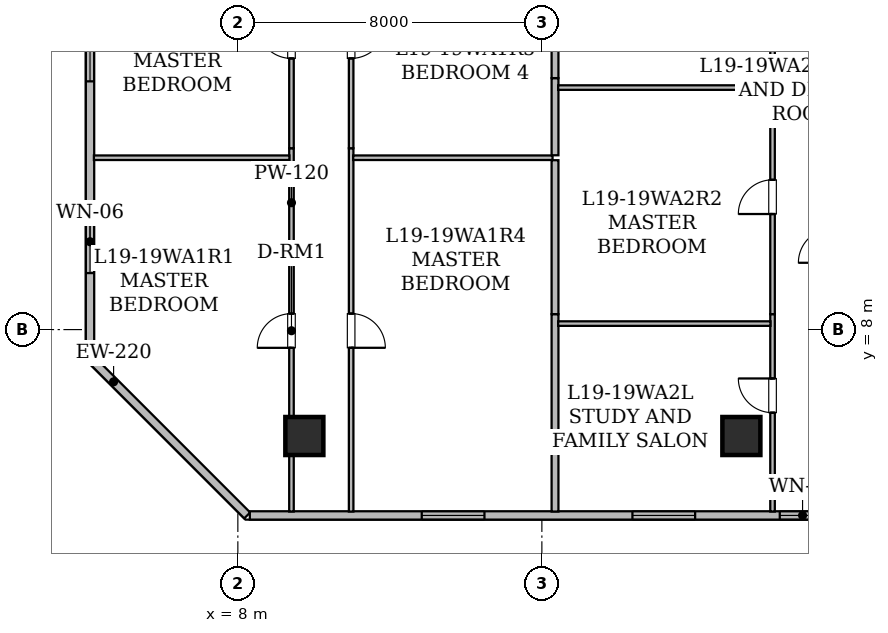
"""IFC4 building model, lengths in metres.
Left out: names, types, materials, properties, quantities, classifications, styles, units other than length and angle.
Written with IfcOpenShell. Run it as: python <this file> out.ifc"""

import sys

from ifc_helpers import new_model, si_unit, direction, frame, frame_2d, origin, origin_2d, place, context, subcontext, project, spatial, rectangle, hollow_rectangle, extrude, element, fill, save


model = new_model("IFC4")
c1 = context("Model", 3, precision=1e-05, world=origin(), true_north=direction((0.0, 1.0)))
c2 = subcontext(c1, "Body", "Model", "MODEL_VIEW")
j1 = project(units=[si_unit("LENGTHUNIT", "METRE"), si_unit("PLANEANGLEUNIT", "RADIAN")], contexts=[c1])
p1 = place(None, origin())
s1 = spatial("IfcSite", under=j1, at=p1, CompositionType="ELEMENT")
p2 = place(p1, origin())
s2 = spatial("IfcBuilding", under=s1, at=p2, CompositionType="ELEMENT")
p3 = place(p2, frame((0.0, 0.0, 77.1)))
s3 = spatial("IfcBuildingStorey", under=s2, at=p3, CompositionType="ELEMENT", Elevation=77.1)
for number, where, z_axis, x_axis in (
    (1, (9.75, 5.2, 0.0), (0.0, 0.0, 1.0), (1.0, 0.0, 0.0)),
    (2, (21.25, 5.2, 0.0), (0.0, 0.0, 1.0), (1.0, 0.0, 0.0)),
):
    element("IfcColumn", number, at=place(p3, frame(where, z_axis=z_axis, x_axis=x_axis)), inside=s3, PredefinedType="COLUMN", context=c2, shape_type="SweptSolid", body=[
        extrude(hollow_rectangle(XDim=1.0, YDim=1.0, WallThickness=0.05, at=origin_2d()), origin(), (0.0, 0.0, 1.0), 3.65),
    ])
p4 = place(p3, frame((8.246, 3.11, 0.0), z_axis=(0.0, 0.0, 1.0), x_axis=(-0.707106781187, 0.707106781187, 0.0)))
e3 = element("IfcWall", 3, at=p4, inside=s3, PredefinedType="STANDARD", context=c2, shape_type="SweptSolid", body=[
    extrude(rectangle(XDim=5.849, YDim=0.22, at=frame_2d((2.925, 0.0))), origin(), (0.0, 0.0, 1.0), 3.43),
])
p5 = place(p3, frame((4.11, 7.317, 0.0), z_axis=(0.0, 0.0, 1.0), x_axis=(0.0, 1.0, 0.0)))
e4 = element("IfcWall", 4, at=p5, inside=s3, PredefinedType="STANDARD", context=c2, shape_type="SweptSolid", body=[
    extrude(rectangle(XDim=17.446, YDim=0.22, at=frame_2d((8.723, 0.0))), origin(), (0.0, 0.0, 1.0), 3.43),
])
p6 = place(p5, frame((2.17, 0.0, 0.85)))
e5 = element("IfcOpeningElement", 5, at=p6, cuts=e4, PredefinedType="OPENING", context=c2, shape_type="SweptSolid", body=[
    extrude(rectangle(XDim=1.65, YDim=1.55, at=frame_2d((0.825, 0.775))), frame((0.0, 0.12, 0.0), z_axis=(0.0, -1.0, 0.0), x_axis=(1.0, 0.0, 0.0)), (0.0, 0.0, 1.0), 0.24),
])
p7 = place(p5, frame((7.215, 0.0, 0.85)))
e6 = element("IfcOpeningElement", 6, at=p7, cuts=e4, PredefinedType="OPENING", context=c2, shape_type="SweptSolid", body=[
    extrude(rectangle(XDim=1.65, YDim=1.55, at=frame_2d((0.825, 0.775))), frame((0.0, 0.12, 0.0), z_axis=(0.0, -1.0, 0.0), x_axis=(1.0, 0.0, 0.0)), (0.0, 0.0, 1.0), 0.24),
])
p8 = place(p5, frame((12.943, 0.0, 0.85)))
e7 = element("IfcOpeningElement", 7, at=p8, cuts=e4, PredefinedType="OPENING", context=c2, shape_type="SweptSolid", body=[
    extrude(rectangle(XDim=1.65, YDim=1.55, at=frame_2d((0.825, 0.775))), frame((0.0, 0.12, 0.0), z_axis=(0.0, -1.0, 0.0), x_axis=(1.0, 0.0, 0.0)), (0.0, 0.0, 1.0), 0.24),
])
p9 = place(p3, frame((45.683, 3.11, 0.0), z_axis=(0.0, 0.0, 1.0), x_axis=(-1.0, 0.0, 0.0)))
e8 = element("IfcWall", 8, at=p9, inside=s3, PredefinedType="STANDARD", context=c2, shape_type="SweptSolid", body=[
    extrude(rectangle(XDim=37.368, YDim=0.22, at=frame_2d((18.684, 0.0))), origin(), (0.0, 0.0, 1.0), 3.43),
])
p10 = place(p9, frame((31.194, 0.0, 0.85)))
e9 = element("IfcOpeningElement", 9, at=p10, cuts=e8, PredefinedType="OPENING", context=c2, shape_type="SweptSolid", body=[
    extrude(rectangle(XDim=1.65, YDim=1.55, at=frame_2d((0.825, 0.775))), frame((0.0, 0.12, 0.0), z_axis=(0.0, -1.0, 0.0), x_axis=(1.0, 0.0, 0.0)), (0.0, 0.0, 1.0), 0.24),
])
p11 = place(p9, frame((19.615, 0.0, 0.85)))
e10 = element("IfcOpeningElement", 10, at=p11, cuts=e8, PredefinedType="OPENING", context=c2, shape_type="SweptSolid", body=[
    extrude(rectangle(XDim=1.65, YDim=1.55, at=frame_2d((0.825, 0.775))), frame((0.0, 0.12, 0.0), z_axis=(0.0, -1.0, 0.0), x_axis=(1.0, 0.0, 0.0)), (0.0, 0.0, 1.0), 0.24),
])
p12 = place(p9, frame((22.223, 0.0, 0.8)))
e11 = element("IfcOpeningElement", 11, at=p12, cuts=e8, PredefinedType="OPENING", context=c2, shape_type="SweptSolid", body=[
    extrude(rectangle(XDim=1.2, YDim=1.5, at=frame_2d((0.6, 0.75))), frame((0.0, 0.12, 0.0), z_axis=(0.0, -1.0, 0.0), x_axis=(1.0, 0.0, 0.0)), (0.0, 0.0, 1.0), 0.24),
])
p13 = place(p9, frame((25.65, 0.0, 0.85)))
e12 = element("IfcOpeningElement", 12, at=p13, cuts=e8, PredefinedType="OPENING", context=c2, shape_type="SweptSolid", body=[
    extrude(rectangle(XDim=1.65, YDim=1.55, at=frame_2d((0.825, 0.775))), frame((0.0, 0.12, 0.0), z_axis=(0.0, -1.0, 0.0), x_axis=(1.0, 0.0, 0.0)), (0.0, 0.0, 1.0), 0.24),
])
p14 = place(p9, frame((10.983, 0.0, 0.8)))
e13 = element("IfcOpeningElement", 13, at=p14, cuts=e8, PredefinedType="OPENING", context=c2, shape_type="SweptSolid", body=[
    extrude(rectangle(XDim=1.2, YDim=1.5, at=frame_2d((0.6, 0.75))), frame((0.0, 0.12, 0.0), z_axis=(0.0, -1.0, 0.0), x_axis=(1.0, 0.0, 0.0)), (0.0, 0.0, 1.0), 0.24),
])
p15 = place(p9, frame((14.783, 0.0, 0.85)))
e14 = element("IfcOpeningElement", 14, at=p15, cuts=e8, PredefinedType="OPENING", context=c2, shape_type="SweptSolid", body=[
    extrude(rectangle(XDim=1.65, YDim=1.55, at=frame_2d((0.825, 0.775))), frame((0.0, 0.12, 0.0), z_axis=(0.0, -1.0, 0.0), x_axis=(1.0, 0.0, 0.0)), (0.0, 0.0, 1.0), 0.24),
])
p16 = place(p9, frame((6.733, 0.0, 0.85)))
e15 = element("IfcOpeningElement", 15, at=p16, cuts=e8, PredefinedType="OPENING", context=c2, shape_type="SweptSolid", body=[
    extrude(rectangle(XDim=1.65, YDim=1.55, at=frame_2d((0.825, 0.775))), frame((0.0, 0.12, 0.0), z_axis=(0.0, -1.0, 0.0), x_axis=(1.0, 0.0, 0.0)), (0.0, 0.0, 1.0), 0.24),
])
p17 = place(p9, frame((2.228, 0.0, 0.85)))
e16 = element("IfcOpeningElement", 16, at=p17, cuts=e8, PredefinedType="OPENING", context=c2, shape_type="SweptSolid", body=[
    extrude(rectangle(XDim=1.65, YDim=1.55, at=frame_2d((0.825, 0.775))), frame((0.0, 0.12, 0.0), z_axis=(0.0, -1.0, 0.0), x_axis=(1.0, 0.0, 0.0)), (0.0, 0.0, 1.0), 0.24),
])
p18 = place(p9, frame((0.187, 0.0, 0.8)))
e17 = element("IfcOpeningElement", 17, at=p18, cuts=e8, PredefinedType="OPENING", context=c2, shape_type="SweptSolid", body=[
    extrude(rectangle(XDim=1.2, YDim=1.5, at=frame_2d((0.6, 0.75))), frame((0.0, 0.12, 0.0), z_axis=(0.0, -1.0, 0.0), x_axis=(1.0, 0.0, 0.0)), (0.0, 0.0, 1.0), 0.24),
])
p19 = place(p3, frame((9.411, 3.212, 0.0), z_axis=(0.0, 0.0, 1.0), x_axis=(0.0, 1.0, 0.0)))
e18 = element("IfcWall", 18, at=p19, inside=s3, PredefinedType="PARTITIONING", context=c2, shape_type="SweptSolid", body=[
    extrude(rectangle(XDim=9.56, YDim=0.12, at=frame_2d((4.78, 0.0))), origin(), (0.0, 0.0, 1.0), 2.647),
])
p20 = place(p19, frame((4.308, 0.0, 0.0)))
e19 = element("IfcOpeningElement", 19, at=p20, cuts=e18, PredefinedType="OPENING", context=c2, shape_type="SweptSolid", body=[
    extrude(rectangle(XDim=0.9, YDim=2.1, at=frame_2d((0.45, 1.05))), frame((0.0, 0.07, 0.0), z_axis=(0.0, -1.0, 0.0), x_axis=(1.0, 0.0, 0.0)), (0.0, 0.0, 1.0), 0.14),
])
p21 = place(p3, frame((9.411, 12.772, 0.0), z_axis=(0.0, 0.0, 1.0), x_axis=(0.0, 1.0, 0.0)))
e20 = element("IfcWall", 20, at=p21, inside=s3, PredefinedType="PARTITIONING", context=c2, shape_type="SweptSolid", body=[
    extrude(rectangle(XDim=5.67, YDim=0.12, at=frame_2d((2.835, 0.0))), origin(), (0.0, 0.0, 1.0), 2.647),
])
p22 = place(p21, frame((2.363, 0.0, 0.0)))
e21 = element("IfcOpeningElement", 21, at=p22, cuts=e20, PredefinedType="OPENING", context=c2, shape_type="SweptSolid", body=[
    extrude(rectangle(XDim=0.9, YDim=2.1, at=frame_2d((0.45, 1.05))), frame((0.0, 0.07, 0.0), z_axis=(0.0, -1.0, 0.0), x_axis=(1.0, 0.0, 0.0)), (0.0, 0.0, 1.0), 0.14),
])
p23 = place(p3, frame((10.981, 12.772, 0.0), z_axis=(0.0, 0.0, 1.0), x_axis=(0.0, -1.0, 0.0)))
e22 = element("IfcWall", 22, at=p23, inside=s3, PredefinedType="PARTITIONING", context=c2, shape_type="SweptSolid", body=[
    extrude(rectangle(XDim=9.56, YDim=0.12, at=frame_2d((4.78, 0.0))), origin(), (0.0, 0.0, 1.0), 2.647),
])
p24 = place(p23, frame((4.351, 0.0, 0.0)))
e23 = element("IfcOpeningElement", 23, at=p24, cuts=e22, PredefinedType="OPENING", context=c2, shape_type="SweptSolid", body=[
    extrude(rectangle(XDim=0.9, YDim=2.1, at=frame_2d((0.45, 1.05))), frame((0.0, 0.07, 0.0), z_axis=(0.0, -1.0, 0.0), x_axis=(1.0, 0.0, 0.0)), (0.0, 0.0, 1.0), 0.14),
])
p25 = place(p3, frame((10.981, 18.442, 0.0), z_axis=(0.0, 0.0, 1.0), x_axis=(0.0, -1.0, 0.0)))
e24 = element("IfcWall", 24, at=p25, inside=s3, PredefinedType="PARTITIONING", context=c2, shape_type="SweptSolid", body=[
    extrude(rectangle(XDim=5.67, YDim=0.12, at=frame_2d((2.835, 0.0))), origin(), (0.0, 0.0, 1.0), 2.647),
])
p26 = place(p25, frame((2.406, 0.0, 0.0)))
e25 = element("IfcOpeningElement", 25, at=p26, cuts=e24, PredefinedType="OPENING", context=c2, shape_type="SweptSolid", body=[
    extrude(rectangle(XDim=0.9, YDim=2.1, at=frame_2d((0.45, 1.05))), frame((0.0, 0.07, 0.0), z_axis=(0.0, -1.0, 0.0), x_axis=(1.0, 0.0, 0.0)), (0.0, 0.0, 1.0), 0.14),
])
p27 = place(p3, frame((4.212, 12.522, 0.0), z_axis=(0.0, 0.0, 1.0), x_axis=(1.0, 0.0, 0.0)))
e26 = element("IfcWall", 26, at=p27, inside=s3, PredefinedType="PARTITIONING", context=c2, shape_type="SweptSolid", body=[
    extrude(rectangle(XDim=5.145, YDim=0.12, at=frame_2d((2.573, 0.0))), origin(), (0.0, 0.0, 1.0), 2.803),
])
p28 = place(p3, frame((11.035, 12.522, 0.0), z_axis=(0.0, 0.0, 1.0), x_axis=(1.0, 0.0, 0.0)))
e27 = element("IfcWall", 27, at=p28, inside=s3, PredefinedType="PARTITIONING", context=c2, shape_type="SweptSolid", body=[
    extrude(rectangle(XDim=5.246, YDim=0.12, at=frame_2d((2.623, 0.0))), origin(), (0.0, 0.0, 1.0), 2.647),
])
p29 = place(p3, frame((16.346, 8.407, 0.0), z_axis=(0.0, 0.0, 1.0), x_axis=(0.0, -1.0, 0.0)))
e28 = element("IfcWall", 28, at=p29, inside=s3, PredefinedType="STANDARD", context=c2, shape_type="SweptSolid", body=[
    extrude(rectangle(XDim=5.195, YDim=0.18, at=frame_2d((2.598, 0.0))), origin(), (0.0, 0.0, 1.0), 2.803),
])
p30 = place(p3, frame((16.346, 12.457, 0.0), z_axis=(0.0, 0.0, 1.0), x_axis=(0.0, -1.0, 0.0)))
e29 = element("IfcWall", 29, at=p30, inside=s3, PredefinedType="STANDARD", context=c2, shape_type="SweptSolid", body=[
    extrude(rectangle(XDim=4.05, YDim=0.18, at=frame_2d((2.025, 0.0))), origin(), (0.0, 0.0, 1.0), 3.43),
])
p31 = place(p3, frame((16.346, 14.617, 0.0), z_axis=(0.0, 0.0, 1.0), x_axis=(0.0, -1.0, 0.0)))
e30 = element("IfcWall", 30, at=p31, inside=s3, PredefinedType="STANDARD", context=c2, shape_type="SweptSolid", body=[
    extrude(rectangle(XDim=2.03, YDim=0.18, at=frame_2d((1.015, 0.0))), origin(), (0.0, 0.0, 1.0), 2.647),
])
p32 = place(p3, frame((16.346, 18.127, 0.0), z_axis=(0.0, 0.0, 1.0), x_axis=(0.0, -1.0, 0.0)))
e31 = element("IfcWall", 31, at=p32, inside=s3, PredefinedType="STANDARD", context=c2, shape_type="SweptSolid", body=[
    extrude(rectangle(XDim=3.51, YDim=0.18, at=frame_2d((1.755, 0.0))), origin(), (0.0, 0.0, 1.0), 2.647),
])
p33 = place(p3, frame((22.07, 3.212, 0.0), z_axis=(0.0, 0.0, 1.0), x_axis=(0.0, 1.0, 0.0)))
e32 = element("IfcWall", 32, at=p33, inside=s3, PredefinedType="PARTITIONING", context=c2, shape_type="SweptSolid", body=[
    extrude(rectangle(XDim=5.195, YDim=0.12, at=frame_2d((2.598, 0.0))), origin(), (0.0, 0.0, 1.0), 2.803),
])
p34 = place(p33, frame((2.602, 0.0, 0.0)))
e33 = element("IfcOpeningElement", 33, at=p34, cuts=e32, PredefinedType="OPENING", context=c2, shape_type="SweptSolid", body=[
    extrude(rectangle(XDim=0.9, YDim=2.1, at=frame_2d((0.45, 1.05))), frame((0.0, 0.07, 0.0), z_axis=(0.0, -1.0, 0.0), x_axis=(1.0, 0.0, 0.0)), (0.0, 0.0, 1.0), 0.14),
])
p35 = place(p3, frame((22.07, 8.407, 0.0), z_axis=(0.0, 0.0, 1.0), x_axis=(0.0, 1.0, 0.0)))
e34 = element("IfcWall", 34, at=p35, inside=s3, PredefinedType="PARTITIONING", context=c2, shape_type="SweptSolid", body=[
    extrude(rectangle(XDim=6.21, YDim=0.12, at=frame_2d((3.105, 0.0))), origin(), (0.0, 0.0, 1.0), 3.43),
])
p36 = place(p35, frame((2.634, 0.0, 0.0)))
e35 = element("IfcOpeningElement", 35, at=p36, cuts=e34, PredefinedType="OPENING", context=c2, shape_type="SweptSolid", body=[
    extrude(rectangle(XDim=0.9, YDim=2.1, at=frame_2d((0.45, 1.05))), frame((0.0, 0.07, 0.0), z_axis=(0.0, -1.0, 0.0), x_axis=(1.0, 0.0, 0.0)), (0.0, 0.0, 1.0), 0.14),
])
p37 = place(p3, frame((22.07, 14.617, 0.0), z_axis=(0.0, 0.0, 1.0), x_axis=(0.0, 1.0, 0.0)))
e36 = element("IfcWall", 36, at=p37, inside=s3, PredefinedType="PARTITIONING", context=c2, shape_type="SweptSolid", body=[
    extrude(rectangle(XDim=7.37, YDim=0.12, at=frame_2d((3.685, 0.0))), origin(), (0.0, 0.0, 1.0), 2.647),
])
p38 = place(p37, frame((3.214, 0.0, 0.0)))
e37 = element("IfcOpeningElement", 37, at=p38, cuts=e36, PredefinedType="OPENING", context=c2, shape_type="SweptSolid", body=[
    extrude(rectangle(XDim=0.9, YDim=2.1, at=frame_2d((0.45, 1.05))), frame((0.0, 0.07, 0.0), z_axis=(0.0, -1.0, 0.0), x_axis=(1.0, 0.0, 0.0)), (0.0, 0.0, 1.0), 0.14),
])
for number, where, z_axis, x_axis in (
    (38, (16.428, 8.158, 0.0), (0.0, 0.0, 1.0), (1.0, 0.0, 0.0)),
    (39, (16.428, 14.368, 0.0), (0.0, 0.0, 1.0), (1.0, 0.0, 0.0)),
):
    element("IfcWall", number, at=place(p3, frame(where, z_axis=z_axis, x_axis=x_axis)), inside=s3, PredefinedType="PARTITIONING", context=c2, shape_type="SweptSolid", body=[
        extrude(rectangle(XDim=5.588, YDim=0.12, at=frame_2d((2.794, 0.0))), origin(), (0.0, 0.0, 1.0), 2.647),
    ])
p39 = place(p6, origin())
e40 = element("IfcWindow", 40, at=p39, inside=s3, PartitioningType="SINGLE_PANEL", PredefinedType="WINDOW", context=c2, shape_type="SweptSolid", body=[
    extrude(rectangle(XDim=1.65, YDim=1.55, at=frame_2d((0.825, 0.775))), frame((0.0, 0.03, 0.0), z_axis=(0.0, -1.0, 0.0), x_axis=(1.0, 0.0, 0.0)), (0.0, 0.0, 1.0), 0.06),
])
fill(e5, e40)
p40 = place(p7, origin())
e41 = element("IfcWindow", 41, at=p40, inside=s3, PartitioningType="SINGLE_PANEL", PredefinedType="WINDOW", context=c2, shape_type="SweptSolid", body=[
    extrude(rectangle(XDim=1.65, YDim=1.55, at=frame_2d((0.825, 0.775))), frame((0.0, 0.03, 0.0), z_axis=(0.0, -1.0, 0.0), x_axis=(1.0, 0.0, 0.0)), (0.0, 0.0, 1.0), 0.06),
])
fill(e6, e41)
p41 = place(p10, origin())
e42 = element("IfcWindow", 42, at=p41, inside=s3, PartitioningType="SINGLE_PANEL", PredefinedType="WINDOW", context=c2, shape_type="SweptSolid", body=[
    extrude(rectangle(XDim=1.65, YDim=1.55, at=frame_2d((0.825, 0.775))), frame((0.0, 0.03, 0.0), z_axis=(0.0, -1.0, 0.0), x_axis=(1.0, 0.0, 0.0)), (0.0, 0.0, 1.0), 0.06),
])
fill(e9, e42)
p42 = place(p12, origin())
e43 = element("IfcWindow", 43, at=p42, inside=s3, PartitioningType="SINGLE_PANEL", PredefinedType="WINDOW", context=c2, shape_type="SweptSolid", body=[
    extrude(rectangle(XDim=1.2, YDim=1.5, at=frame_2d((0.6, 0.75))), frame((0.0, 0.03, 0.0), z_axis=(0.0, -1.0, 0.0), x_axis=(1.0, 0.0, 0.0)), (0.0, 0.0, 1.0), 0.06),
])
fill(e11, e43)
p43 = place(p13, origin())
e44 = element("IfcWindow", 44, at=p43, inside=s3, PartitioningType="SINGLE_PANEL", PredefinedType="WINDOW", context=c2, shape_type="SweptSolid", body=[
    extrude(rectangle(XDim=1.65, YDim=1.55, at=frame_2d((0.825, 0.775))), frame((0.0, 0.03, 0.0), z_axis=(0.0, -1.0, 0.0), x_axis=(1.0, 0.0, 0.0)), (0.0, 0.0, 1.0), 0.06),
])
fill(e12, e44)
p44 = place(p20, origin())
e45 = element("IfcDoor", 45, at=p44, inside=s3, OperationType="SINGLE_SWING_LEFT", PredefinedType="DOOR", context=c2, shape_type="SweptSolid", body=[
    extrude(rectangle(XDim=0.9, YDim=2.1, at=frame_2d((0.45, 1.05))), frame((0.0, 0.025, 0.0), z_axis=(0.0, -1.0, 0.0), x_axis=(1.0, 0.0, 0.0)), (0.0, 0.0, 1.0), 0.05),
])
fill(e19, e45)
p45 = place(p22, origin())
e46 = element("IfcDoor", 46, at=p45, inside=s3, OperationType="SINGLE_SWING_RIGHT", PredefinedType="DOOR", context=c2, shape_type="SweptSolid", body=[
    extrude(rectangle(XDim=0.9, YDim=2.1, at=frame_2d((0.45, 1.05))), frame((0.0, 0.025, 0.0), z_axis=(0.0, -1.0, 0.0), x_axis=(1.0, 0.0, 0.0)), (0.0, 0.0, 1.0), 0.05),
])
fill(e21, e46)
p46 = place(p24, origin())
e47 = element("IfcDoor", 47, at=p46, inside=s3, OperationType="SINGLE_SWING_RIGHT", PredefinedType="DOOR", context=c2, shape_type="SweptSolid", body=[
    extrude(rectangle(XDim=0.9, YDim=2.1, at=frame_2d((0.45, 1.05))), frame((0.0, 0.025, 0.0), z_axis=(0.0, -1.0, 0.0), x_axis=(1.0, 0.0, 0.0)), (0.0, 0.0, 1.0), 0.05),
])
fill(e23, e47)
p47 = place(p26, origin())
e48 = element("IfcDoor", 48, at=p47, inside=s3, OperationType="SINGLE_SWING_LEFT", PredefinedType="DOOR", context=c2, shape_type="SweptSolid", body=[
    extrude(rectangle(XDim=0.9, YDim=2.1, at=frame_2d((0.45, 1.05))), frame((0.0, 0.025, 0.0), z_axis=(0.0, -1.0, 0.0), x_axis=(1.0, 0.0, 0.0)), (0.0, 0.0, 1.0), 0.05),
])
fill(e25, e48)
p48 = place(p34, origin())
e49 = element("IfcDoor", 49, at=p48, inside=s3, OperationType="SINGLE_SWING_RIGHT", PredefinedType="DOOR", context=c2, shape_type="SweptSolid", body=[
    extrude(rectangle(XDim=0.9, YDim=2.1, at=frame_2d((0.45, 1.05))), frame((0.0, 0.025, 0.0), z_axis=(0.0, -1.0, 0.0), x_axis=(1.0, 0.0, 0.0)), (0.0, 0.0, 1.0), 0.05),
])
fill(e33, e49)
p49 = place(p36, origin())
e50 = element("IfcDoor", 50, at=p49, inside=s3, OperationType="SINGLE_SWING_LEFT", PredefinedType="DOOR", context=c2, shape_type="SweptSolid", body=[
    extrude(rectangle(XDim=0.9, YDim=2.1, at=frame_2d((0.45, 1.05))), frame((0.0, 0.025, 0.0), z_axis=(0.0, -1.0, 0.0), x_axis=(1.0, 0.0, 0.0)), (0.0, 0.0, 1.0), 0.05),
])
fill(e35, e50)
save(model, sys.argv[1])
